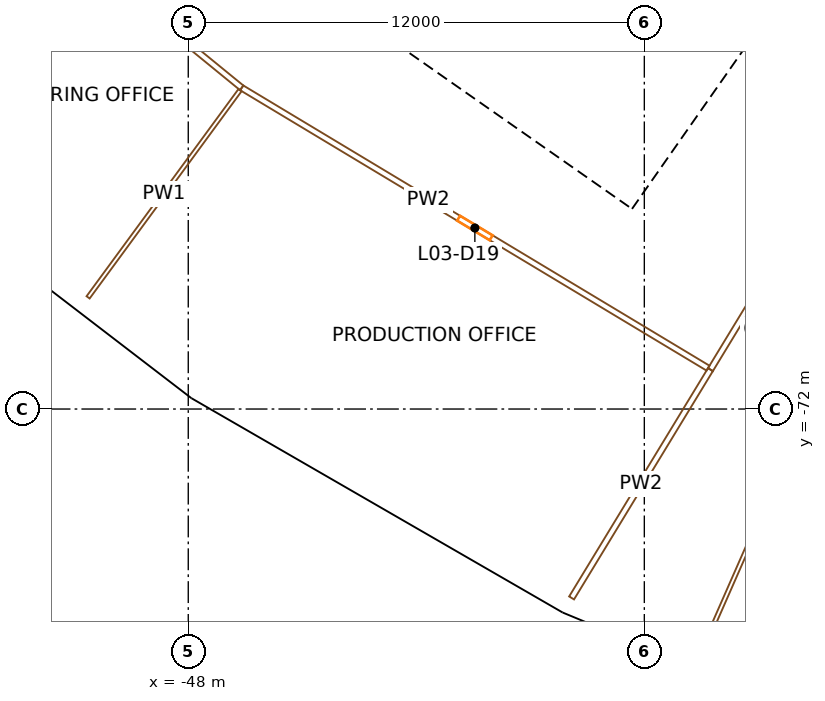
"""IFC4 building model, lengths in metres.
Left out: names, types, materials, properties, quantities, classifications, styles, units other than length and angle.
Written with IfcOpenShell. Run it as: python <this file> out.ifc"""

import sys

from ifc_helpers import new_model, si_unit, direction, frame, frame_2d, origin, origin_2d, place, context, subcontext, project, spatial, rectangle, extrude, element, fill, save


model = new_model("IFC4")
c1 = context("Model", 3, precision=1e-05, world=origin(), true_north=direction((0.0, 1.0)))
c2 = subcontext(c1, "Body", "Model", "MODEL_VIEW")
j1 = project(units=[si_unit("LENGTHUNIT", "METRE"), si_unit("PLANEANGLEUNIT", "RADIAN")], contexts=[c1])
p1 = place(None, origin())
s1 = spatial("IfcSite", under=j1, at=p1, CompositionType="ELEMENT")
p2 = place(p1, origin())
s2 = spatial("IfcBuilding", under=s1, at=p2, CompositionType="ELEMENT")
p3 = place(p2, frame((0.0, 0.0, 27.0)))
s3 = spatial("IfcBuildingStorey", under=s2, at=p3, CompositionType="ELEMENT", Elevation=27.0)
p4 = place(p3, frame((-43.196, -64.647, 0.0), z_axis=(0.0, 0.0, 1.0), x_axis=(0.831469612303, -0.55557023302, 0.0)))
e1 = element("IfcColumn", 1, at=p4, inside=s3, PredefinedType="COLUMN", context=c2, shape_type="SweptSolid", body=[
    extrude(rectangle(XDim=1.4, YDim=1.8, at=origin_2d()), origin(), (0.0, 0.0, 1.0), 4.5),
])
p5 = place(p3, frame((-47.362, -70.883, 0.0), z_axis=(0.0, 0.0, 1.0), x_axis=(0.831469612303, -0.55557023302, 0.0)))
e2 = element("IfcColumn", 2, at=p5, inside=s3, PredefinedType="COLUMN", context=c2, shape_type="SweptSolid", body=[
    extrude(rectangle(XDim=1.1, YDim=1.3, at=origin_2d()), origin(), (0.0, 0.0, 1.0), 4.5),
])
p6 = place(p3, frame((-34.388, -69.732, 0.0), z_axis=(0.0, 0.0, 1.0), x_axis=(0.896872741533, -0.442288690219, 0.0)))
e3 = element("IfcColumn", 3, at=p6, inside=s3, PredefinedType="COLUMN", context=c2, shape_type="SweptSolid", body=[
    extrude(rectangle(XDim=1.4, YDim=1.8, at=origin_2d()), origin(), (0.0, 0.0, 1.0), 4.5),
])
p7 = place(p3, frame((-37.705, -76.458, 0.0), z_axis=(0.0, 0.0, 1.0), x_axis=(0.896872741533, -0.442288690219, 0.0)))
e4 = element("IfcColumn", 4, at=p7, inside=s3, PredefinedType="COLUMN", context=c2, shape_type="SweptSolid", body=[
    extrude(rectangle(XDim=1.1, YDim=1.3, at=origin_2d()), origin(), (0.0, 0.0, 1.0), 4.5),
])
p8 = place(p3, frame((-36.717, -66.337, 0.0), z_axis=(0.0, 0.0, 1.0), x_axis=(0.573577477574, 0.819151315216, 0.0)))
e5 = element("IfcWall", 5, at=p8, inside=s3, PredefinedType="SHEAR", context=c2, shape_type="SweptSolid", body=[
    extrude(rectangle(XDim=14.8, YDim=0.9, at=frame_2d((7.4, 0.0))), origin(), (0.0, 0.0, 1.0), 4.1),
])
p9 = place(p8, frame((6.2, 0.0, 0.0)))
e6 = element("IfcOpeningElement", 6, at=p9, cuts=e5, PredefinedType="OPENING", context=c2, shape_type="SweptSolid", body=[
    extrude(rectangle(XDim=2.4, YDim=2.1, at=frame_2d((1.2, 1.05))), frame((0.0, 0.46, 0.0), z_axis=(0.0, -1.0, 0.0), x_axis=(1.0, 0.0, 0.0)), (0.0, 0.0, 1.0), 0.92),
])
p10 = place(p3, frame((-36.827, -65.71, 0.0), z_axis=(0.0, 0.0, 1.0), x_axis=(-0.819153391756, 0.573574511963, 0.0)))
e7 = element("IfcWall", 7, at=p10, inside=s3, PredefinedType="SHEAR", context=c2, shape_type="SweptSolid", body=[
    extrude(rectangle(XDim=15.045, YDim=0.9, at=frame_2d((7.523, 0.0))), origin(), (0.0, 0.0, 1.0), 4.1),
])
p11 = place(p10, frame((1.05, 0.0, 0.0)))
e8 = element("IfcOpeningElement", 8, at=p11, cuts=e7, PredefinedType="OPENING", context=c2, shape_type="SweptSolid", body=[
    extrude(rectangle(XDim=1.0, YDim=2.1, at=frame_2d((0.5, 1.05))), frame((0.0, 0.46, 0.0), z_axis=(0.0, -1.0, 0.0), x_axis=(1.0, 0.0, 0.0)), (0.0, 0.0, 1.0), 0.92),
])
p12 = place(p10, frame((3.625, 0.0, 0.0)))
e9 = element("IfcOpeningElement", 9, at=p12, cuts=e7, PredefinedType="OPENING", context=c2, shape_type="SweptSolid", body=[
    extrude(rectangle(XDim=1.0, YDim=2.1, at=frame_2d((0.5, 1.05))), frame((0.0, 0.46, 0.0), z_axis=(0.0, -1.0, 0.0), x_axis=(1.0, 0.0, 0.0)), (0.0, 0.0, 1.0), 0.92),
])
p13 = place(p10, frame((6.075, 0.0, 0.0)))
e10 = element("IfcOpeningElement", 10, at=p13, cuts=e7, PredefinedType="OPENING", context=c2, shape_type="SweptSolid", body=[
    extrude(rectangle(XDim=1.0, YDim=2.1, at=frame_2d((0.5, 1.05))), frame((0.0, 0.46, 0.0), z_axis=(0.0, -1.0, 0.0), x_axis=(1.0, 0.0, 0.0)), (0.0, 0.0, 1.0), 0.92),
])
p14 = place(p10, frame((13.495, 0.0, 0.0)))
e11 = element("IfcOpeningElement", 11, at=p14, cuts=e7, PredefinedType="OPENING", context=c2, shape_type="SweptSolid", body=[
    extrude(rectangle(XDim=1.1, YDim=2.1, at=frame_2d((0.55, 1.05))), frame((0.0, 0.46, 0.0), z_axis=(0.0, -1.0, 0.0), x_axis=(1.0, 0.0, 0.0)), (0.0, 0.0, 1.0), 0.92),
])
p15 = place(p3, frame((-35.221, -63.417, 0.0), z_axis=(0.0, 0.0, 1.0), x_axis=(-0.819166993208, 0.573555086491, 0.0)))
e12 = element("IfcWall", 12, at=p15, inside=s3, PredefinedType="SOLIDWALL", context=c2, shape_type="SweptSolid", body=[
    extrude(rectangle(XDim=7.95, YDim=0.3, at=frame_2d((3.975, 0.0))), origin(), (0.0, 0.0, 1.0), 4.1),
])
p16 = place(p3, frame((-37.929, -61.704, 0.0), z_axis=(0.0, 0.0, 1.0), x_axis=(-0.573559170999, -0.819164133348, 0.0)))
e13 = element("IfcWall", 13, at=p16, inside=s3, PredefinedType="PLUMBINGWALL", context=c2, shape_type="SweptSolid", body=[
    extrude(rectangle(XDim=2.2, YDim=0.1, at=frame_2d((1.1, 0.0))), origin(), (0.0, 0.0, 1.0), 4.1),
])
p17 = place(p3, frame((-56.673, -64.713, 0.0), z_axis=(0.0, 0.0, 1.0), x_axis=(0.793355377778, -0.608758773695, 0.0)))
e14 = element("IfcWall", 14, at=p17, inside=s3, PredefinedType="SOLIDWALL", context=c2, shape_type="SweptSolid", body=[
    extrude(rectangle(XDim=11.135, YDim=0.45, at=frame_2d((5.567, 0.0))), origin(), (0.0, 0.0, 1.0), 3.2),
])
p18 = place(p17, frame((3.917, 0.0, 0.9)))
e15 = element("IfcOpeningElement", 15, at=p18, cuts=e14, PredefinedType="OPENING", context=c2, shape_type="SweptSolid", body=[
    extrude(rectangle(XDim=1.2, YDim=2.15, at=frame_2d((0.6, 1.075))), frame((0.0, 0.235, 0.0), z_axis=(0.0, -1.0, 0.0), x_axis=(1.0, 0.0, 0.0)), (0.0, 0.0, 1.0), 0.47),
])
p19 = place(p17, frame((6.017, 0.0, 0.9)))
e16 = element("IfcOpeningElement", 16, at=p19, cuts=e14, PredefinedType="OPENING", context=c2, shape_type="SweptSolid", body=[
    extrude(rectangle(XDim=1.2, YDim=2.15, at=frame_2d((0.6, 1.075))), frame((0.0, 0.235, 0.0), z_axis=(0.0, -1.0, 0.0), x_axis=(1.0, 0.0, 0.0)), (0.0, 0.0, 1.0), 0.47),
])
p20 = place(p3, frame((-47.819, -71.512, 0.0), z_axis=(0.0, 0.0, 1.0), x_axis=(0.866024577697, -0.500001430823, 0.0)))
e17 = element("IfcWall", 17, at=p20, inside=s3, PredefinedType="SOLIDWALL", context=c2, shape_type="SweptSolid", body=[
    extrude(rectangle(XDim=11.312, YDim=0.45, at=frame_2d((5.656, 0.0))), origin(), (0.0, 0.0, 1.0), 3.2),
])
p21 = place(p20, frame((4.006, 0.0, 0.9)))
e18 = element("IfcOpeningElement", 18, at=p21, cuts=e17, PredefinedType="OPENING", context=c2, shape_type="SweptSolid", body=[
    extrude(rectangle(XDim=1.2, YDim=2.15, at=frame_2d((0.6, 1.075))), frame((0.0, 0.235, 0.0), z_axis=(0.0, -1.0, 0.0), x_axis=(1.0, 0.0, 0.0)), (0.0, 0.0, 1.0), 0.47),
])
p22 = place(p20, frame((6.106, 0.0, 0.9)))
e19 = element("IfcOpeningElement", 19, at=p22, cuts=e17, PredefinedType="OPENING", context=c2, shape_type="SweptSolid", body=[
    extrude(rectangle(XDim=1.2, YDim=2.15, at=frame_2d((0.6, 1.075))), frame((0.0, 0.235, 0.0), z_axis=(0.0, -1.0, 0.0), x_axis=(1.0, 0.0, 0.0)), (0.0, 0.0, 1.0), 0.47),
])
p23 = place(p3, frame((-37.993, -77.176, 0.0), z_axis=(0.0, 0.0, 1.0), x_axis=(0.923874126662, -0.382696482978, 0.0)))
e20 = element("IfcWall", 20, at=p23, inside=s3, PredefinedType="SOLIDWALL", context=c2, shape_type="SweptSolid", body=[
    extrude(rectangle(XDim=11.135, YDim=0.45, at=frame_2d((5.567, 0.0))), origin(), (0.0, 0.0, 1.0), 3.2),
])
p24 = place(p23, frame((3.917, 0.0, 0.9)))
e21 = element("IfcOpeningElement", 21, at=p24, cuts=e20, PredefinedType="OPENING", context=c2, shape_type="SweptSolid", body=[
    extrude(rectangle(XDim=1.2, YDim=2.15, at=frame_2d((0.6, 1.075))), frame((0.0, 0.235, 0.0), z_axis=(0.0, -1.0, 0.0), x_axis=(1.0, 0.0, 0.0)), (0.0, 0.0, 1.0), 0.47),
])
p25 = place(p23, frame((6.017, 0.0, 0.9)))
e22 = element("IfcOpeningElement", 22, at=p25, cuts=e20, PredefinedType="OPENING", context=c2, shape_type="SweptSolid", body=[
    extrude(rectangle(XDim=1.2, YDim=2.15, at=frame_2d((0.6, 1.075))), frame((0.0, 0.235, 0.0), z_axis=(0.0, -1.0, 0.0), x_axis=(1.0, 0.0, 0.0)), (0.0, 0.0, 1.0), 0.47),
])
p26 = place(p3, frame((-46.594, -63.549, 0.0), z_axis=(0.0, 0.0, 1.0), x_axis=(-0.774664810718, 0.632372066931, 0.0)))
e23 = element("IfcWall", 23, at=p26, inside=s3, PredefinedType="PARTITIONING", context=c2, shape_type="SweptSolid", body=[
    extrude(rectangle(XDim=8.112, YDim=0.15, at=frame_2d((4.056, 0.0))), origin(), (0.0, 0.0, 1.0), 3.1),
])
p27 = place(p26, frame((3.556, 0.0, 0.0)))
e24 = element("IfcOpeningElement", 24, at=p27, cuts=e23, PredefinedType="OPENING", context=c2, shape_type="SweptSolid", body=[
    extrude(rectangle(XDim=1.0, YDim=2.1, at=frame_2d((0.5, 1.05))), frame((0.0, 0.085, 0.0), z_axis=(0.0, -1.0, 0.0), x_axis=(1.0, 0.0, 0.0)), (0.0, 0.0, 1.0), 0.17),
])
p28 = place(p3, frame((-50.635, -69.062, 0.0), z_axis=(0.0, 0.0, 1.0), x_axis=(0.591304174152, 0.806448618097, 0.0)))
e25 = element("IfcWall", 25, at=p28, inside=s3, PredefinedType="PARTITIONING", context=c2, shape_type="SweptSolid", body=[
    extrude(rectangle(XDim=6.761, YDim=0.1, at=frame_2d((3.38, 0.0))), origin(), (0.0, 0.0, 1.0), 3.1),
])
p29 = place(p3, frame((-34.324, -70.924, 0.0), z_axis=(0.0, 0.0, 1.0), x_axis=(-0.857078823531, 0.51518529701, 0.0)))
e26 = element("IfcWall", 26, at=p29, inside=s3, PredefinedType="PARTITIONING", context=c2, shape_type="SweptSolid", body=[
    extrude(rectangle(XDim=14.315, YDim=0.15, at=frame_2d((7.158, 0.0))), origin(), (0.0, 0.0, 1.0), 3.1),
])
p30 = place(p29, frame((6.657, 0.0, 0.0)))
e27 = element("IfcOpeningElement", 27, at=p30, cuts=e26, PredefinedType="OPENING", context=c2, shape_type="SweptSolid", body=[
    extrude(rectangle(XDim=1.0, YDim=2.1, at=frame_2d((0.5, 1.05))), frame((0.0, 0.085, 0.0), z_axis=(0.0, -1.0, 0.0), x_axis=(1.0, 0.0, 0.0)), (0.0, 0.0, 1.0), 0.17),
])
p31 = place(p3, frame((-34.492, -78.383, 0.0), z_axis=(0.0, 0.0, 1.0), x_axis=(0.402767118416, 0.915302490067, 0.0)))
e28 = element("IfcWall", 28, at=p31, inside=s3, PredefinedType="PARTITIONING", context=c2, shape_type="SweptSolid", body=[
    extrude(rectangle(XDim=16.361, YDim=0.1, at=frame_2d((8.18, 0.0))), origin(), (0.0, 0.0, 1.0), 3.1),
])
p32 = place(p3, frame((-34.26, -70.963, 0.0), z_axis=(0.0, 0.0, 1.0), x_axis=(-0.519582317334, -0.854420397412, 0.0)))
e29 = element("IfcWall", 29, at=p32, inside=s3, PredefinedType="PARTITIONING", context=c2, shape_type="SweptSolid", body=[
    extrude(rectangle(XDim=7.032, YDim=0.15, at=frame_2d((3.516, 0.0))), origin(), (0.0, 0.0, 1.0), 3.1),
])
p33 = place(p3, frame((-29.207, -62.652, 0.0), z_axis=(0.0, 0.0, 1.0), x_axis=(-0.519573423316, -0.854425805897, 0.0)))
e30 = element("IfcWall", 30, at=p33, inside=s3, PredefinedType="PARTITIONING", context=c2, shape_type="SweptSolid", body=[
    extrude(rectangle(XDim=9.726, YDim=0.15, at=frame_2d((4.863, 0.0))), origin(), (0.0, 0.0, 1.0), 3.1),
])
p34 = place(p33, frame((4.413, 0.0, 0.0)))
e31 = element("IfcOpeningElement", 31, at=p34, cuts=e30, PredefinedType="OPENING", context=c2, shape_type="SweptSolid", body=[
    extrude(rectangle(XDim=0.9, YDim=2.1, at=frame_2d((0.45, 1.05))), frame((0.0, 0.085, 0.0), z_axis=(0.0, -1.0, 0.0), x_axis=(1.0, 0.0, 0.0)), (0.0, 0.0, 1.0), 0.17),
])
p35 = place(p11, origin())
e32 = element("IfcDoor", 32, at=p35, inside=s3, OperationType="SINGLE_SWING_LEFT", PredefinedType="DOOR", context=c2, shape_type="SweptSolid", body=[
    extrude(rectangle(XDim=1.0, YDim=2.1, at=frame_2d((0.5, 1.05))), frame((0.0, 0.025, 0.0), z_axis=(0.0, -1.0, 0.0), x_axis=(1.0, 0.0, 0.0)), (0.0, 0.0, 1.0), 0.05),
])
fill(e8, e32)
p36 = place(p12, origin())
e33 = element("IfcDoor", 33, at=p36, inside=s3, OperationType="SINGLE_SWING_RIGHT", PredefinedType="DOOR", context=c2, shape_type="SweptSolid", body=[
    extrude(rectangle(XDim=1.0, YDim=2.1, at=frame_2d((0.5, 1.05))), frame((0.0, 0.025, 0.0), z_axis=(0.0, -1.0, 0.0), x_axis=(1.0, 0.0, 0.0)), (0.0, 0.0, 1.0), 0.05),
])
fill(e9, e33)
p37 = place(p19, origin())
e34 = element("IfcWindow", 34, at=p37, inside=s3, PartitioningType="SINGLE_PANEL", PredefinedType="WINDOW", context=c2, shape_type="SweptSolid", body=[
    extrude(rectangle(XDim=1.2, YDim=2.15, at=frame_2d((0.6, 1.075))), frame((0.0, 0.03, 0.0), z_axis=(0.0, -1.0, 0.0), x_axis=(1.0, 0.0, 0.0)), (0.0, 0.0, 1.0), 0.06),
])
fill(e16, e34)
p38 = place(p21, origin())
e35 = element("IfcWindow", 35, at=p38, inside=s3, PartitioningType="SINGLE_PANEL", PredefinedType="WINDOW", context=c2, shape_type="SweptSolid", body=[
    extrude(rectangle(XDim=1.2, YDim=2.15, at=frame_2d((0.6, 1.075))), frame((0.0, 0.03, 0.0), z_axis=(0.0, -1.0, 0.0), x_axis=(1.0, 0.0, 0.0)), (0.0, 0.0, 1.0), 0.06),
])
fill(e18, e35)
p39 = place(p22, origin())
e36 = element("IfcWindow", 36, at=p39, inside=s3, PartitioningType="SINGLE_PANEL", PredefinedType="WINDOW", context=c2, shape_type="SweptSolid", body=[
    extrude(rectangle(XDim=1.2, YDim=2.15, at=frame_2d((0.6, 1.075))), frame((0.0, 0.03, 0.0), z_axis=(0.0, -1.0, 0.0), x_axis=(1.0, 0.0, 0.0)), (0.0, 0.0, 1.0), 0.06),
])
fill(e19, e36)
p40 = place(p30, origin())
e37 = element("IfcDoor", 37, at=p40, inside=s3, OperationType="SINGLE_SWING_RIGHT", PredefinedType="DOOR", context=c2, shape_type="SweptSolid", body=[
    extrude(rectangle(XDim=1.0, YDim=2.1, at=frame_2d((0.5, 1.05))), frame((0.0, 0.025, 0.0), z_axis=(0.0, -1.0, 0.0), x_axis=(1.0, 0.0, 0.0)), (0.0, 0.0, 1.0), 0.05),
])
fill(e27, e37)
save(model, sys.argv[1])
